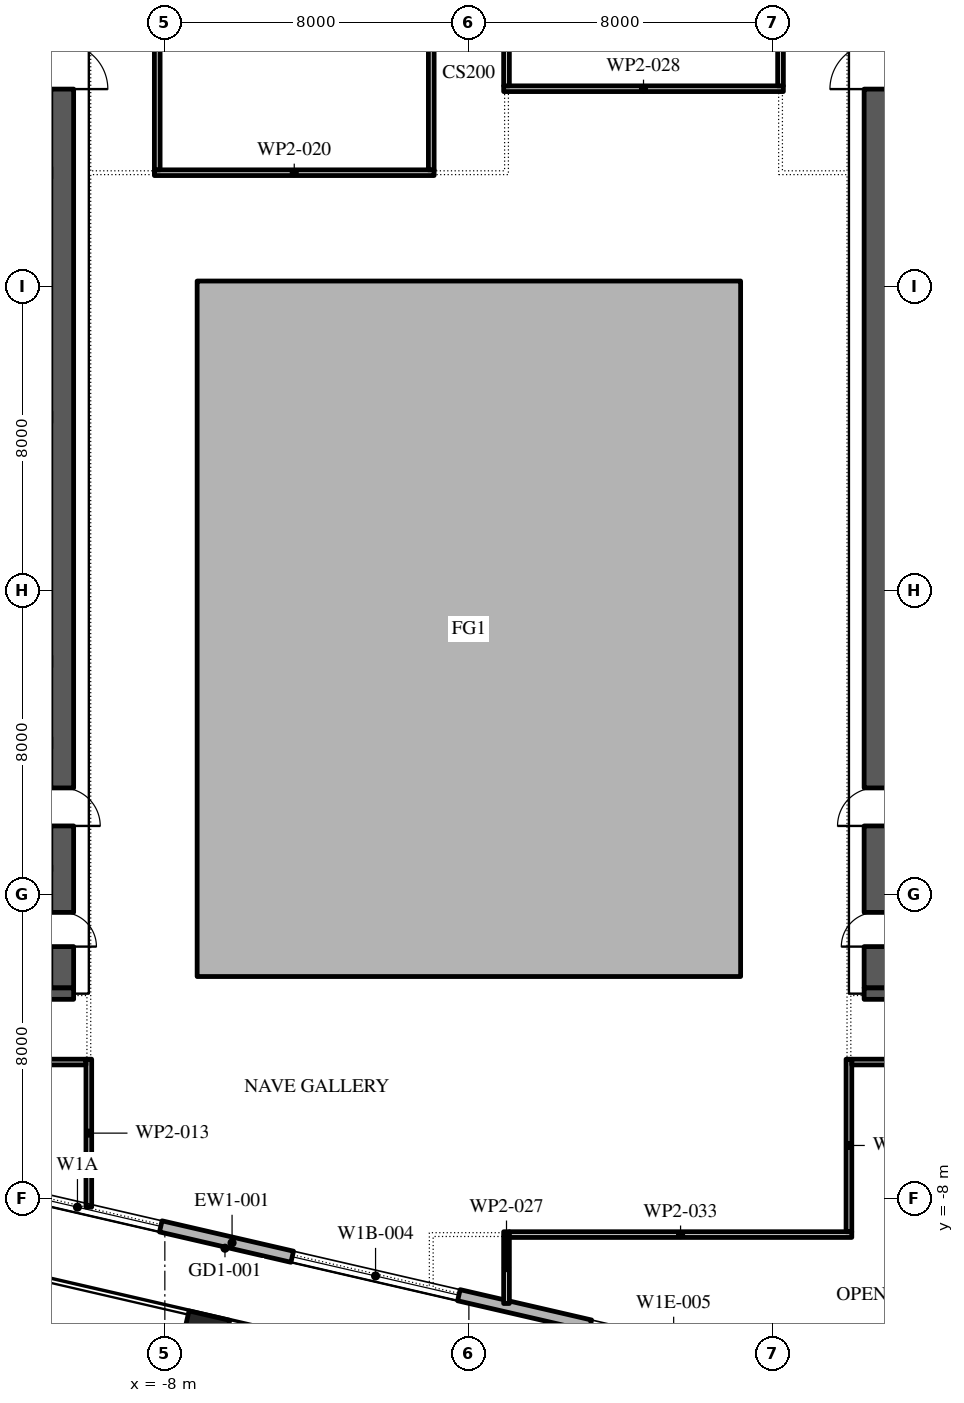
"""IFC4 building model, lengths in metres.
Left out: names, types, materials, properties, quantities, classifications, styles, units other than length and angle.
Written with IfcOpenShell. Run it as: python <this file> out.ifc"""

import sys

from ifc_helpers import new_model, si_unit, direction, frame, frame_2d, origin, origin_2d, place, context, subcontext, project, spatial, polyline, rectangle, outline, extrude, element, fill, save


model = new_model("IFC4")
c1 = context("Model", 3, precision=1e-05, world=origin(), true_north=direction((0.0, 1.0)))
c2 = subcontext(c1, "Body", "Model", "MODEL_VIEW")
j1 = project(units=[si_unit("LENGTHUNIT", "METRE"), si_unit("PLANEANGLEUNIT", "RADIAN")], contexts=[c1])
p1 = place(None, origin())
s1 = spatial("IfcSite", under=j1, at=p1, CompositionType="ELEMENT")
p2 = place(p1, origin())
s2 = spatial("IfcBuilding", under=s1, at=p2, CompositionType="ELEMENT")
p3 = place(p2, frame((0.0, 0.0, 280.8)))
s3 = spatial("IfcBuildingStorey", under=s2, at=p3, CompositionType="ELEMENT", Elevation=280.8)
p4 = place(p3, frame((-6.951, -11.608, 0.0), z_axis=(0.0, 0.0, 1.0), x_axis=(0.974370064785, -0.224951054344, 0.0)))
e1 = element("IfcColumn", 1, at=p4, inside=s3, PredefinedType="COLUMN", context=c2, shape_type="SweptSolid", body=[
    extrude(rectangle(XDim=1.1, YDim=1.1, at=origin_2d()), origin(), (0.0, 0.0, 1.0), 4.2),
])
p5 = place(p3, origin())
e2 = element("IfcWall", 2, at=p5, inside=s3, PredefinedType="STANDARD", context=c2, shape_type="SweptSolid", body=[
    extrude(outline(polyline([(-7.15, -2.15), (7.15, -2.15), (7.15, 16.15), (-7.15, 16.15), (-7.15, -2.15)]), holes=[polyline([(-7.0, -2.0), (-7.0, 16.0), (7.0, 16.0), (7.0, -2.0), (-7.0, -2.0)])]), origin(), (0.0, 0.0, 1.0), 4.0),
])
p6 = place(p3, frame((-29.616, -3.758, 0.0), z_axis=(0.0, 0.0, 1.0), x_axis=(0.974370532314, -0.224949029246, 0.0)))
e3 = element("IfcWall", 3, at=p6, inside=s3, PredefinedType="STANDARD", context=c2, shape_type="SweptSolid", body=[
    extrude(rectangle(XDim=48.0, YDim=0.3, at=frame_2d((24.0, 0.0))), origin(), (0.0, 0.0, 1.0), 4.0),
])
p7 = place(p6, frame((1.625, 0.0, 0.45)))
e4 = element("IfcOpeningElement", 4, at=p7, cuts=e3, PredefinedType="OPENING", context=c2, shape_type="SweptSolid", body=[
    extrude(rectangle(XDim=4.5, YDim=3.05, at=frame_2d((2.25, 1.525))), frame((0.0, 0.16, 0.0), z_axis=(0.0, -1.0, 0.0), x_axis=(1.0, 0.0, 0.0)), (0.0, 0.0, 1.0), 0.32),
])
p8 = place(p6, frame((10.575, 0.0, 0.0)))
e5 = element("IfcOpeningElement", 5, at=p8, cuts=e3, PredefinedType="OPENING", context=c2, shape_type="SweptSolid", body=[
    extrude(rectangle(XDim=2.4, YDim=3.5, at=frame_2d((1.2, 1.75))), frame((0.0, 0.16, 0.0), z_axis=(0.0, -1.0, 0.0), x_axis=(1.0, 0.0, 0.0)), (0.0, 0.0, 1.0), 0.32),
])
p9 = place(p6, frame((17.575, 0.0, 0.45)))
e6 = element("IfcOpeningElement", 6, at=p9, cuts=e3, PredefinedType="OPENING", context=c2, shape_type="SweptSolid", body=[
    extrude(rectangle(XDim=4.5, YDim=3.0, at=frame_2d((2.25, 1.5))), frame((0.0, 0.16, 0.0), z_axis=(0.0, -1.0, 0.0), x_axis=(1.0, 0.0, 0.0)), (0.0, 0.0, 1.0), 0.32),
])
p10 = place(p6, frame((25.625, 0.0, 0.45)))
e7 = element("IfcOpeningElement", 7, at=p10, cuts=e3, PredefinedType="OPENING", context=c2, shape_type="SweptSolid", body=[
    extrude(rectangle(XDim=4.5, YDim=2.95, at=frame_2d((2.25, 1.475))), frame((0.0, 0.16, 0.0), z_axis=(0.0, -1.0, 0.0), x_axis=(1.0, 0.0, 0.0)), (0.0, 0.0, 1.0), 0.32),
])
p11 = place(p6, frame((33.675, 0.0, 0.45)))
e8 = element("IfcOpeningElement", 8, at=p11, cuts=e3, PredefinedType="OPENING", context=c2, shape_type="SweptSolid", body=[
    extrude(rectangle(XDim=4.5, YDim=2.825, at=frame_2d((2.25, 1.413))), frame((0.0, 0.16, 0.0), z_axis=(0.0, -1.0, 0.0), x_axis=(1.0, 0.0, 0.0)), (0.0, 0.0, 1.0), 0.32),
])
p12 = place(p6, frame((42.775, 0.0, 0.0)))
e9 = element("IfcOpeningElement", 9, at=p12, cuts=e3, PredefinedType="OPENING", context=c2, shape_type="SweptSolid", body=[
    extrude(rectangle(XDim=2.4, YDim=3.5, at=frame_2d((1.2, 1.75))), frame((0.0, 0.16, 0.0), z_axis=(0.0, -1.0, 0.0), x_axis=(1.0, 0.0, 0.0)), (0.0, 0.0, 1.0), 0.32),
])
p13 = place(p3, frame((-10.7, -2.45, 0.0), z_axis=(0.0, 0.0, 1.0), x_axis=(0.0, 1.0, 0.0)))
e10 = element("IfcWall", 10, at=p13, inside=s3, PredefinedType="SHEAR", context=c2, shape_type="SweptSolid", body=[
    extrude(rectangle(XDim=27.9, YDim=0.6, at=frame_2d((13.95, 0.0))), origin(), (0.0, 0.0, 1.0), 4.0),
])
p14 = place(p13, frame((23.65, 0.0, 0.0)))
e11 = element("IfcOpeningElement", 11, at=p14, cuts=e10, PredefinedType="OPENING", context=c2, shape_type="SweptSolid", body=[
    extrude(rectangle(XDim=2.4, YDim=2.1, at=frame_2d((1.2, 1.05))), frame((0.0, 0.31, 0.0), z_axis=(0.0, -1.0, 0.0), x_axis=(1.0, 0.0, 0.0)), (0.0, 0.0, 1.0), 0.62),
])
p15 = place(p13, frame((1.087, 0.0, 0.0)))
e12 = element("IfcOpeningElement", 12, at=p15, cuts=e10, PredefinedType="OPENING", context=c2, shape_type="SweptSolid", body=[
    extrude(rectangle(XDim=0.9, YDim=2.1, at=frame_2d((0.45, 1.05))), frame((0.0, 0.31, 0.0), z_axis=(0.0, -1.0, 0.0), x_axis=(1.0, 0.0, 0.0)), (0.0, 0.0, 1.0), 0.62),
])
p16 = place(p13, frame((4.262, 0.0, 0.0)))
e13 = element("IfcOpeningElement", 13, at=p16, cuts=e10, PredefinedType="OPENING", context=c2, shape_type="SweptSolid", body=[
    extrude(rectangle(XDim=1.0, YDim=2.1, at=frame_2d((0.5, 1.05))), frame((0.0, 0.31, 0.0), z_axis=(0.0, -1.0, 0.0), x_axis=(1.0, 0.0, 0.0)), (0.0, 0.0, 1.0), 0.62),
])
p17 = place(p3, frame((-21.6, -2.6, 0.0), z_axis=(0.0, 0.0, 1.0), x_axis=(1.0, 0.0, 0.0)))
e14 = element("IfcWall", 14, at=p17, inside=s3, PredefinedType="SHEAR", context=c2, shape_type="SweptSolid", body=[
    extrude(rectangle(XDim=11.2, YDim=0.3, at=frame_2d((5.6, 0.0))), origin(), (0.0, 0.0, 1.0), 4.0),
])
p18 = place(p3, frame((10.7, -2.45, 0.0), z_axis=(0.0, 0.0, 1.0), x_axis=(0.0, 1.0, 0.0)))
e15 = element("IfcWall", 15, at=p18, inside=s3, PredefinedType="SHEAR", context=c2, shape_type="SweptSolid", body=[
    extrude(rectangle(XDim=27.9, YDim=0.6, at=frame_2d((13.95, 0.0))), origin(), (0.0, 0.0, 1.0), 4.0),
])
p19 = place(p18, frame((23.65, 0.0, 0.0)))
e16 = element("IfcOpeningElement", 16, at=p19, cuts=e15, PredefinedType="OPENING", context=c2, shape_type="SweptSolid", body=[
    extrude(rectangle(XDim=2.4, YDim=2.1, at=frame_2d((1.2, 1.05))), frame((0.0, 0.31, 0.0), z_axis=(0.0, -1.0, 0.0), x_axis=(1.0, 0.0, 0.0)), (0.0, 0.0, 1.0), 0.62),
])
p20 = place(p18, frame((1.087, 0.0, 0.0)))
e17 = element("IfcOpeningElement", 17, at=p20, cuts=e15, PredefinedType="OPENING", context=c2, shape_type="SweptSolid", body=[
    extrude(rectangle(XDim=0.9, YDim=2.1, at=frame_2d((0.45, 1.05))), frame((0.0, 0.31, 0.0), z_axis=(0.0, -1.0, 0.0), x_axis=(1.0, 0.0, 0.0)), (0.0, 0.0, 1.0), 0.62),
])
p21 = place(p18, frame((4.262, 0.0, 0.0)))
e18 = element("IfcOpeningElement", 18, at=p21, cuts=e15, PredefinedType="OPENING", context=c2, shape_type="SweptSolid", body=[
    extrude(rectangle(XDim=1.0, YDim=2.1, at=frame_2d((0.5, 1.05))), frame((0.0, 0.31, 0.0), z_axis=(0.0, -1.0, 0.0), x_axis=(1.0, 0.0, 0.0)), (0.0, 0.0, 1.0), 0.62),
])
p22 = place(p3, frame((10.4, -2.6, 0.0), z_axis=(0.0, 0.0, 1.0), x_axis=(1.0, 0.0, 0.0)))
e19 = element("IfcWall", 19, at=p22, inside=s3, PredefinedType="SHEAR", context=c2, shape_type="SweptSolid", body=[
    extrude(rectangle(XDim=11.2, YDim=0.3, at=frame_2d((5.6, 0.0))), origin(), (0.0, 0.0, 1.0), 4.0),
])
p23 = place(p3, frame((-10.0, -8.216, 0.0), z_axis=(0.0, 0.0, 1.0), x_axis=(0.0, 1.0, 0.0)))
e20 = element("IfcWall", 20, at=p23, inside=s3, PredefinedType="PARTITIONING", context=c2, shape_type="SweptSolid", body=[
    extrude(rectangle(XDim=3.891, YDim=0.15, at=frame_2d((1.946, 0.0))), origin(), (0.0, 0.0, 1.0), 4.0),
])
p24 = place(p3, frame((-10.075, -4.4, 0.0), z_axis=(0.0, 0.0, 1.0), x_axis=(-1.0, 0.0, 0.0)))
e21 = element("IfcWall", 21, at=p24, inside=s3, PredefinedType="PARTITIONING", context=c2, shape_type="SweptSolid", body=[
    extrude(rectangle(XDim=11.88, YDim=0.15, at=frame_2d((5.94, 0.0))), origin(), (0.0, 0.0, 1.0), 4.0),
])
p25 = place(p24, frame((5.555, 0.0, 0.0)))
e22 = element("IfcOpeningElement", 22, at=p25, cuts=e21, PredefinedType="OPENING", context=c2, shape_type="SweptSolid", body=[
    extrude(rectangle(XDim=1.0, YDim=2.1, at=frame_2d((0.5, 1.05))), frame((0.0, 0.085, 0.0), z_axis=(0.0, -1.0, 0.0), x_axis=(1.0, 0.0, 0.0)), (0.0, 0.0, 1.0), 0.17),
])
p26 = place(p3, frame((-8.275, 19.0, 0.0), z_axis=(0.0, 0.0, 1.0), x_axis=(1.0, 0.0, 0.0)))
e23 = element("IfcWall", 23, at=p26, inside=s3, PredefinedType="PARTITIONING", context=c2, shape_type="SweptSolid", body=[
    extrude(rectangle(XDim=7.36, YDim=0.15, at=frame_2d((3.68, 0.0))), origin(), (0.0, 0.0, 1.0), 4.0),
])
p27 = place(p3, frame((-8.2, 29.71, 0.0), z_axis=(0.0, 0.0, 1.0), x_axis=(0.0, -1.0, 0.0)))
e24 = element("IfcWall", 24, at=p27, inside=s3, PredefinedType="PARTITIONING", context=c2, shape_type="SweptSolid", body=[
    extrude(rectangle(XDim=10.635, YDim=0.15, at=frame_2d((5.317, 0.0))), origin(), (0.0, 0.0, 1.0), 4.0),
])
p28 = place(p27, frame((2.81, 0.0, 0.0)))
e25 = element("IfcOpeningElement", 25, at=p28, cuts=e24, PredefinedType="OPENING", context=c2, shape_type="SweptSolid", body=[
    extrude(rectangle(XDim=1.0, YDim=2.1, at=frame_2d((0.5, 1.05))), frame((0.0, 0.085, 0.0), z_axis=(0.0, -1.0, 0.0), x_axis=(1.0, 0.0, 0.0)), (0.0, 0.0, 1.0), 0.17),
])
p29 = place(p3, frame((-0.99, 19.075, 0.0), z_axis=(0.0, 0.0, 1.0), x_axis=(0.0, 1.0, 0.0)))
e26 = element("IfcWall", 26, at=p29, inside=s3, PredefinedType="PARTITIONING", context=c2, shape_type="SweptSolid", body=[
    extrude(rectangle(XDim=10.535, YDim=0.15, at=frame_2d((5.268, 0.0))), origin(), (0.0, 0.0, 1.0), 4.0),
])
p30 = place(p3, frame((0.99, -8.865, 0.0), z_axis=(0.0, 0.0, 1.0), x_axis=(0.0, -1.0, 0.0)))
e27 = element("IfcWall", 27, at=p30, inside=s3, PredefinedType="PARTITIONING", context=c2, shape_type="SweptSolid", body=[
    extrude(rectangle(XDim=1.888, YDim=0.15, at=frame_2d((0.944, 0.0))), origin(), (0.0, 0.0, 1.0), 4.0),
])
p31 = place(p3, frame((0.915, 21.21, 0.0), z_axis=(0.0, 0.0, 1.0), x_axis=(1.0, 0.0, 0.0)))
e28 = element("IfcWall", 28, at=p31, inside=s3, PredefinedType="PARTITIONING", context=c2, shape_type="SweptSolid", body=[
    extrude(rectangle(XDim=7.36, YDim=0.15, at=frame_2d((3.68, 0.0))), origin(), (0.0, 0.0, 1.0), 4.0),
])
p32 = place(p3, frame((0.99, 35.05, 0.0), z_axis=(0.0, 0.0, 1.0), x_axis=(0.0, -1.0, 0.0)))
e29 = element("IfcWall", 29, at=p32, inside=s3, PredefinedType="PARTITIONING", context=c2, shape_type="SweptSolid", body=[
    extrude(rectangle(XDim=13.765, YDim=0.15, at=frame_2d((6.883, 0.0))), origin(), (0.0, 0.0, 1.0), 4.0),
])
p33 = place(p32, frame((3.69, 0.0, 0.0)))
e30 = element("IfcOpeningElement", 30, at=p33, cuts=e29, PredefinedType="OPENING", context=c2, shape_type="SweptSolid", body=[
    extrude(rectangle(XDim=1.0, YDim=2.1, at=frame_2d((0.5, 1.05))), frame((0.0, 0.085, 0.0), z_axis=(0.0, -1.0, 0.0), x_axis=(1.0, 0.0, 0.0)), (0.0, 0.0, 1.0), 0.17),
])
p34 = place(p3, frame((8.2, 21.285, 0.0), z_axis=(0.0, 0.0, 1.0), x_axis=(0.0, 1.0, 0.0)))
e31 = element("IfcWall", 31, at=p34, inside=s3, PredefinedType="PARTITIONING", context=c2, shape_type="SweptSolid", body=[
    extrude(rectangle(XDim=11.29, YDim=0.15, at=frame_2d((5.645, 0.0))), origin(), (0.0, 0.0, 1.0), 4.0),
])
p35 = place(p3, frame((10.075, -8.94, 0.0), z_axis=(0.0, 0.0, 1.0), x_axis=(-1.0, 0.0, 0.0)))
e32 = element("IfcWall", 32, at=p35, inside=s3, PredefinedType="PARTITIONING", context=c2, shape_type="SweptSolid", body=[
    extrude(rectangle(XDim=9.01, YDim=0.15, at=frame_2d((4.505, 0.0))), origin(), (0.0, 0.0, 1.0), 4.0),
])
p36 = place(p3, frame((10.0, -4.325, 0.0), z_axis=(0.0, 0.0, 1.0), x_axis=(0.0, -1.0, 0.0)))
e33 = element("IfcWall", 33, at=p36, inside=s3, PredefinedType="PARTITIONING", context=c2, shape_type="SweptSolid", body=[
    extrude(rectangle(XDim=4.54, YDim=0.15, at=frame_2d((2.27, 0.0))), origin(), (0.0, 0.0, 1.0), 4.0),
])
p37 = place(p3, frame((22.968, -4.4, 0.0), z_axis=(0.0, 0.0, 1.0), x_axis=(-1.0, 0.0, 0.0)))
e34 = element("IfcWall", 34, at=p37, inside=s3, PredefinedType="PARTITIONING", context=c2, shape_type="SweptSolid", body=[
    extrude(rectangle(XDim=12.893, YDim=0.15, at=frame_2d((6.447, 0.0))), origin(), (0.0, 0.0, 1.0), 4.0),
])
p38 = place(p37, frame((3.318, 0.0, 0.0)))
e35 = element("IfcOpeningElement", 35, at=p38, cuts=e34, PredefinedType="OPENING", context=c2, shape_type="SweptSolid", body=[
    extrude(rectangle(XDim=1.0, YDim=2.1, at=frame_2d((0.5, 1.05))), frame((0.0, 0.085, 0.0), z_axis=(0.0, -1.0, 0.0), x_axis=(1.0, 0.0, 0.0)), (0.0, 0.0, 1.0), 0.17),
])
p39 = place(p9, origin())
e36 = element("IfcWindow", 36, at=p39, inside=s3, PartitioningType="DOUBLE_PANEL_VERTICAL", PredefinedType="WINDOW", context=c2, shape_type="SweptSolid", body=[
    extrude(rectangle(XDim=4.5, YDim=3.0, at=frame_2d((2.25, 1.5))), frame((0.0, 0.03, 0.0), z_axis=(0.0, -1.0, 0.0), x_axis=(1.0, 0.0, 0.0)), (0.0, 0.0, 1.0), 0.06),
])
fill(e6, e36)
p40 = place(p10, origin())
e37 = element("IfcWindow", 37, at=p40, inside=s3, PartitioningType="DOUBLE_PANEL_VERTICAL", PredefinedType="WINDOW", context=c2, shape_type="SweptSolid", body=[
    extrude(rectangle(XDim=4.5, YDim=2.95, at=frame_2d((2.25, 1.475))), frame((0.0, 0.03, 0.0), z_axis=(0.0, -1.0, 0.0), x_axis=(1.0, 0.0, 0.0)), (0.0, 0.0, 1.0), 0.06),
])
fill(e7, e37)
p41 = place(p14, frame((2.4, 0.0, 0.0), z_axis=(0.0, 0.0, 1.0), x_axis=(-1.0, 0.0, 0.0)))
e38 = element("IfcDoor", 38, at=p41, inside=s3, OperationType="DOUBLE_DOOR_SINGLE_SWING", PredefinedType="DOOR", context=c2, shape_type="SweptSolid", body=[
    extrude(rectangle(XDim=2.4, YDim=2.1, at=frame_2d((1.2, 1.05))), frame((0.0, 0.025, 0.0), z_axis=(0.0, -1.0, 0.0), x_axis=(1.0, 0.0, 0.0)), (0.0, 0.0, 1.0), 0.05),
])
fill(e11, e38)
p42 = place(p19, origin())
e39 = element("IfcDoor", 39, at=p42, inside=s3, OperationType="DOUBLE_DOOR_SINGLE_SWING", PredefinedType="DOOR", context=c2, shape_type="SweptSolid", body=[
    extrude(rectangle(XDim=2.4, YDim=2.1, at=frame_2d((1.2, 1.05))), frame((0.0, 0.025, 0.0), z_axis=(0.0, -1.0, 0.0), x_axis=(1.0, 0.0, 0.0)), (0.0, 0.0, 1.0), 0.05),
])
fill(e16, e39)
save(model, sys.argv[1])
